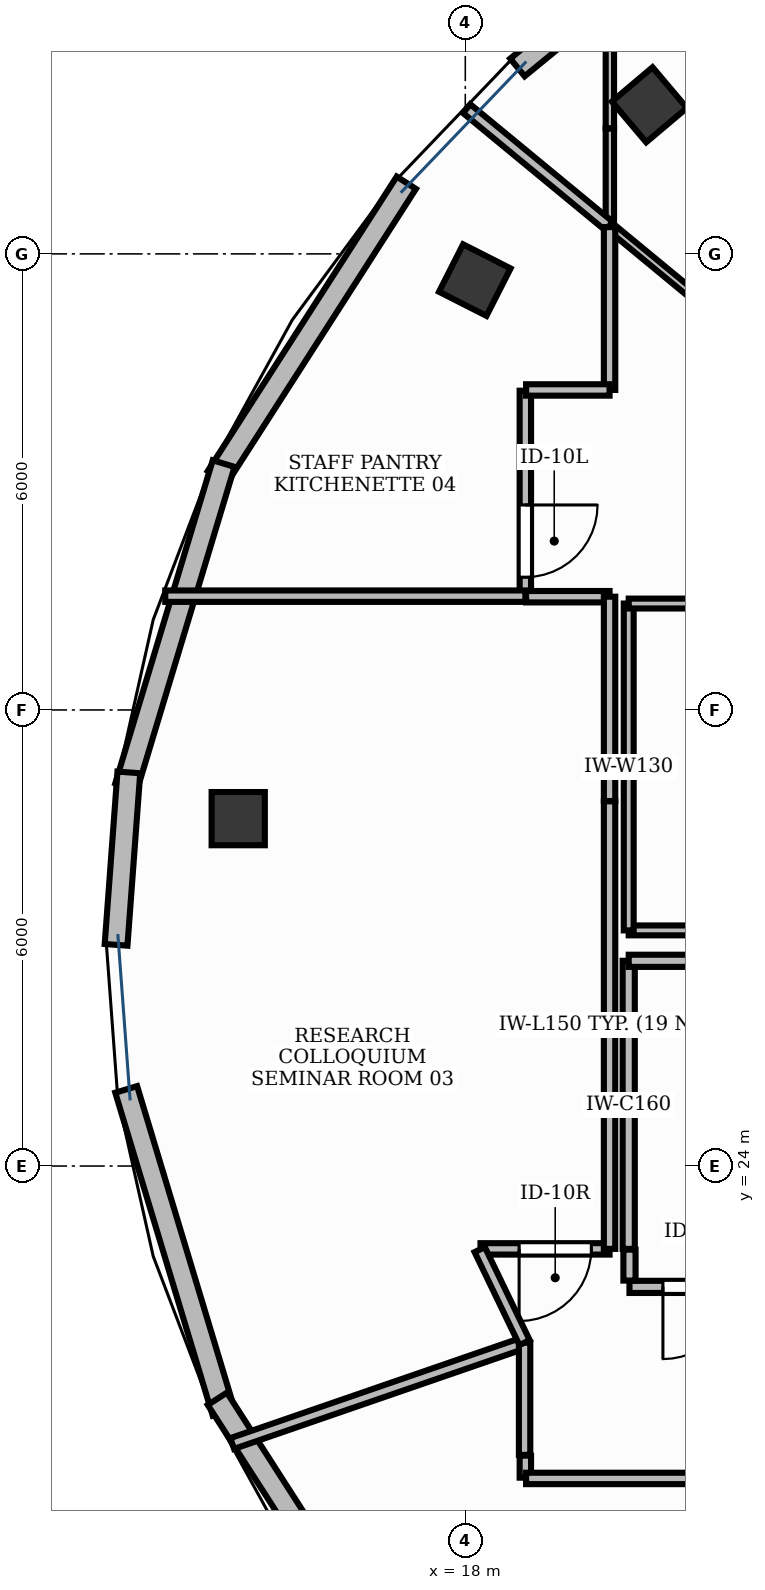
"""IFC4 building model, lengths in metres.
Left out: names, types, materials, properties, quantities, classifications, styles, units other than length and angle.
Written with IfcOpenShell. Run it as: python <this file> out.ifc"""

import sys

from ifc_helpers import new_model, si_unit, direction, frame, frame_2d, origin, origin_2d, place, context, subcontext, project, spatial, rectangle, extrude, element, fill, save


model = new_model("IFC4")
c1 = context("Model", 3, precision=1e-05, world=origin(), true_north=direction((0.0, 1.0)))
c2 = subcontext(c1, "Body", "Model", "MODEL_VIEW")
j1 = project(units=[si_unit("LENGTHUNIT", "METRE"), si_unit("PLANEANGLEUNIT", "RADIAN")], contexts=[c1])
p1 = place(None, origin())
s1 = spatial("IfcSite", under=j1, at=p1, CompositionType="ELEMENT")
p2 = place(p1, origin())
s2 = spatial("IfcBuilding", under=s1, at=p2, CompositionType="ELEMENT")
p3 = place(p2, frame((0.0, 0.0, 322.8)))
s3 = spatial("IfcBuildingStorey", under=s2, at=p3, CompositionType="ELEMENT", Elevation=322.8)
for number, where, z_axis, x_axis in (
    (1, (20.422, 37.962, -0.0), (0.0, 0.0, 1.0), (0.764, 0.645, 0.0)),
    (2, (18.125, 35.655, -0.0), (0.0, 0.0, 1.0), (0.453, 0.891, 0.0)),
    (3, (15.013, 28.57, -0.0), (0.0, 0.0, 1.0), (0.0, 1.0, 0.0)),
):
    element("IfcColumn", number, at=place(p3, frame(where, z_axis=z_axis, x_axis=x_axis)), inside=s3, PredefinedType="COLUMN", context=c2, shape_type="SweptSolid", body=[
        extrude(rectangle(XDim=0.7, YDim=0.7, at=origin_2d()), origin(), (0.0, 0.0, 1.0), 3.901),
    ])
p4 = place(p3, frame((20.64, 40.054, 0.0), z_axis=(0.0, 0.0, 1.0), x_axis=(-0.77351792086, -0.633774428411, 0.0)))
e4 = element("IfcWall", 4, at=p4, inside=s3, PredefinedType="STANDARD", context=c2, shape_type="SweptSolid", body=[
    extrude(rectangle(XDim=2.526, YDim=0.3, at=frame_2d((1.263, 0.0))), origin(), (0.0, 0.0, 1.0), 3.9),
])
p5 = place(p3, frame((17.224, 36.936, 0.0), z_axis=(0.0, 0.0, 1.0), x_axis=(-0.540087262842, -0.841609023547, 0.0)))
e5 = element("IfcWall", 5, at=p5, inside=s3, PredefinedType="STANDARD", context=c2, shape_type="SweptSolid", body=[
    extrude(rectangle(XDim=4.603, YDim=0.3, at=frame_2d((2.302, 0.0))), origin(), (0.0, 0.0, 1.0), 3.9),
])
p6 = place(p3, frame((14.821, 33.241, 0.0), z_axis=(0.0, 0.0, 1.0), x_axis=(-0.288720187326, -0.95741352269, 0.0)))
e6 = element("IfcWall", 6, at=p6, inside=s3, PredefinedType="STANDARD", context=c2, shape_type="SweptSolid", body=[
    extrude(rectangle(XDim=4.438, YDim=0.3, at=frame_2d((2.219, 0.0))), origin(), (0.0, 0.0, 1.0), 3.9),
])
p7 = place(p3, frame((13.573, 29.178, 0.0), z_axis=(0.0, 0.0, 1.0), x_axis=(-0.073741209899, -0.997277410735, 0.0)))
e7 = element("IfcWall", 7, at=p7, inside=s3, PredefinedType="STANDARD", context=c2, shape_type="SweptSolid", body=[
    extrude(rectangle(XDim=2.274, YDim=0.3, at=frame_2d((1.137, 0.0))), origin(), (0.0, 0.0, 1.0), 3.9),
])
p8 = place(p3, frame((13.539, 25.008, 0.0), z_axis=(0.0, 0.0, 1.0), x_axis=(0.288720187326, -0.95741352269, 0.0)))
e8 = element("IfcWall", 8, at=p8, inside=s3, PredefinedType="STANDARD", context=c2, shape_type="SweptSolid", body=[
    extrude(rectangle(XDim=4.438, YDim=0.3, at=frame_2d((2.219, 0.0))), origin(), (0.0, 0.0, 1.0), 3.9),
])
p9 = place(p3, frame((14.738, 20.938, 0.0), z_axis=(0.0, 0.0, 1.0), x_axis=(0.540087262842, -0.841609023547, 0.0)))
e9 = element("IfcWall", 9, at=p9, inside=s3, PredefinedType="STANDARD", context=c2, shape_type="SweptSolid", body=[
    extrude(rectangle(XDim=4.603, YDim=0.3, at=frame_2d((2.302, 0.0))), origin(), (0.0, 0.0, 1.0), 3.9),
])
p10 = place(p3, frame((21.79, 22.41, 0.0), z_axis=(0.0, 0.0, 1.0), x_axis=(-1.0, 0.0, 0.0)))
e10 = element("IfcWall", 10, at=p10, inside=s3, PredefinedType="PARTITIONING", context=c2, shape_type="SweptSolid", body=[
    extrude(rectangle(XDim=1.63, YDim=0.16, at=frame_2d((0.815, 0.0))), origin(), (0.0, 0.0, 1.0), 2.22),
])
p11 = place(p10, frame((0.24, 0.0, 0.0)))
e11 = element("IfcOpeningElement", 11, at=p11, cuts=e10, PredefinedType="OPENING", context=c2, shape_type="SweptSolid", body=[
    extrude(rectangle(XDim=0.95, YDim=2.15, at=frame_2d((0.475, 1.075))), frame((0.0, 0.095, 0.0), z_axis=(0.0, -1.0, 0.0), x_axis=(1.0, 0.0, 0.0)), (0.0, 0.0, 1.0), 0.19),
])
p12 = place(p3, frame((19.898, 22.91, 0.0), z_axis=(0.0, 0.0, 1.0), x_axis=(-1.0, 0.0, 0.0)))
e12 = element("IfcWall", 12, at=p12, inside=s3, PredefinedType="PARTITIONING", context=c2, shape_type="SweptSolid", body=[
    extrude(rectangle(XDim=1.698, YDim=0.15, at=frame_2d((0.849, 0.0))), origin(), (0.0, 0.0, 1.0), 2.22),
])
p13 = place(p12, frame((0.24, 0.0, 0.0)))
e13 = element("IfcOpeningElement", 13, at=p13, cuts=e12, PredefinedType="OPENING", context=c2, shape_type="SweptSolid", body=[
    extrude(rectangle(XDim=0.95, YDim=2.15, at=frame_2d((0.475, 1.075))), frame((0.0, 0.09, 0.0), z_axis=(0.0, -1.0, 0.0), x_axis=(1.0, 0.0, 0.0)), (0.0, 0.0, 1.0), 0.18),
])
p14 = place(p3, frame((18.79, 34.2, 0.0), z_axis=(0.0, 0.0, 1.0), x_axis=(0.0, -1.0, 0.0)))
e14 = element("IfcWall", 14, at=p14, inside=s3, PredefinedType="PARTITIONING", context=c2, shape_type="SweptSolid", body=[
    extrude(rectangle(XDim=2.693, YDim=0.15, at=frame_2d((1.346, 0.0))), origin(), (0.0, 0.0, 1.0), 2.22),
])
p15 = place(p14, frame((1.503, 0.0, 0.0)))
e15 = element("IfcOpeningElement", 15, at=p15, cuts=e14, PredefinedType="OPENING", context=c2, shape_type="SweptSolid", body=[
    extrude(rectangle(XDim=0.95, YDim=2.15, at=frame_2d((0.475, 1.075))), frame((0.0, 0.09, 0.0), z_axis=(0.0, -1.0, 0.0), x_axis=(1.0, 0.0, 0.0)), (0.0, 0.0, 1.0), 0.18),
])
p16 = place(p3, frame((20.16, 22.493, 0.0), z_axis=(0.0, 0.0, 1.0), x_axis=(0.0, 1.0, 0.0)))
e16 = element("IfcWall", 16, at=p16, inside=s3, PredefinedType="PARTITIONING", context=c2, shape_type="SweptSolid", body=[
    extrude(rectangle(XDim=0.407, YDim=0.16, at=frame_2d((0.204, 0.0))), origin(), (0.0, 0.0, 1.0), 2.22),
])
p17 = place(p3, frame((20.15, 22.91, 0.0), z_axis=(0.0, 0.0, 1.0), x_axis=(0.0, 1.0, 0.0)))
e17 = element("IfcWall", 17, at=p17, inside=s3, PredefinedType="PARTITIONING", context=c2, shape_type="SweptSolid", body=[
    extrude(rectangle(XDim=3.79, YDim=0.16, at=frame_2d((1.895, 0.0))), origin(), (0.0, 0.0, 1.0), 2.22),
])
p18 = place(p3, frame((20.15, 26.7, 0.0), z_axis=(0.0, 0.0, 1.0), x_axis=(1.0, 0.0, 0.0)))
e18 = element("IfcWall", 18, at=p18, inside=s3, PredefinedType="PARTITIONING", context=c2, shape_type="SweptSolid", body=[
    extrude(rectangle(XDim=1.64, YDim=0.16, at=frame_2d((0.82, 0.0))), origin(), (0.0, 0.0, 1.0), 2.22),
])
p19 = place(p3, frame((21.79, 27.1, 0.0), z_axis=(0.0, 0.0, 1.0), x_axis=(-1.0, 0.0, 0.0)))
e19 = element("IfcWall", 19, at=p19, inside=s3, PredefinedType="PARTITIONING", context=c2, shape_type="SweptSolid", body=[
    extrude(rectangle(XDim=1.64, YDim=0.13, at=frame_2d((0.82, 0.0))), origin(), (0.0, 0.0, 1.0), 2.22),
])
p20 = place(p3, frame((20.15, 27.1, 0.0), z_axis=(0.0, 0.0, 1.0), x_axis=(0.0, 1.0, 0.0)))
e20 = element("IfcWall", 20, at=p20, inside=s3, PredefinedType="PARTITIONING", context=c2, shape_type="SweptSolid", body=[
    extrude(rectangle(XDim=4.3, YDim=0.13, at=frame_2d((2.15, 0.0))), origin(), (0.0, 0.0, 1.0), 2.22),
])
p21 = place(p3, frame((20.15, 31.4, 0.0), z_axis=(0.0, 0.0, 1.0), x_axis=(1.0, 0.0, 0.0)))
e21 = element("IfcWall", 21, at=p21, inside=s3, PredefinedType="PARTITIONING", context=c2, shape_type="SweptSolid", body=[
    extrude(rectangle(XDim=1.64, YDim=0.13, at=frame_2d((0.82, 0.0))), origin(), (0.0, 0.0, 1.0), 2.22),
])
p22 = place(p3, frame((14.934, 20.35, 0.0), z_axis=(0.0, 0.0, 1.0), x_axis=(0.945331527332, 0.326110875979, 0.0)))
e22 = element("IfcWall", 22, at=p22, inside=s3, PredefinedType="PARTITIONING", context=c2, shape_type="SweptSolid", body=[
    extrude(rectangle(XDim=4.069, YDim=0.15, at=frame_2d((2.034, 0.0))), origin(), (0.0, 0.0, 1.0), 2.22),
])
p23 = place(p3, frame((18.78, 21.677, 0.0), z_axis=(0.0, 0.0, 1.0), x_axis=(0.0, -1.0, 0.0)))
e23 = element("IfcWall", 23, at=p23, inside=s3, PredefinedType="PARTITIONING", context=c2, shape_type="SweptSolid", body=[
    extrude(rectangle(XDim=1.477, YDim=0.15, at=frame_2d((0.738, 0.0))), origin(), (0.0, 0.0, 1.0), 2.22),
])
p24 = place(p3, frame((18.79, 20.19, 0.0), z_axis=(0.0, 0.0, 1.0), x_axis=(0.0, -1.0, 0.0)))
e24 = element("IfcWall", 24, at=p24, inside=s3, PredefinedType="PARTITIONING", context=c2, shape_type="SweptSolid", body=[
    extrude(rectangle(XDim=0.29, YDim=0.15, at=frame_2d((0.145, 0.0))), origin(), (0.0, 0.0, 1.0), 2.22),
])
p25 = place(p3, frame((18.8, 19.89, 0.0), z_axis=(0.0, 0.0, 1.0), x_axis=(1.0, 0.0, 0.0)))
e25 = element("IfcWall", 25, at=p25, inside=s3, PredefinedType="PARTITIONING", context=c2, shape_type="SweptSolid", body=[
    extrude(rectangle(XDim=2.99, YDim=0.15, at=frame_2d((1.495, 0.0))), origin(), (0.0, 0.0, 1.0), 2.22),
])
p26 = place(p3, frame((19.902, 37.652, 0.0), z_axis=(0.0, 0.0, 1.0), x_axis=(0.0, 1.0, 0.0)))
e26 = element("IfcWall", 26, at=p26, inside=s3, PredefinedType="MOVABLE", context=c2, shape_type="SweptSolid", body=[
    extrude(rectangle(XDim=1.873, YDim=0.11, at=frame_2d((0.937, 0.0))), origin(), (0.0, 0.0, 1.0), 2.22),
])
p27 = place(p3, frame((21.79, 34.805, 0.0), z_axis=(0.0, 0.0, 1.0), x_axis=(-0.771457748332, 0.636280553325, 0.0)))
e27 = element("IfcWall", 27, at=p27, inside=s3, PredefinedType="MOVABLE", context=c2, shape_type="SweptSolid", body=[
    extrude(rectangle(XDim=2.447, YDim=0.11, at=frame_2d((1.224, 0.0))), origin(), (0.0, 0.0, 1.0), 2.22),
])
p28 = place(p3, frame((19.902, 36.362, 0.0), z_axis=(0.0, 0.0, 1.0), x_axis=(0.0, 1.0, 0.0)))
e28 = element("IfcWall", 28, at=p28, inside=s3, PredefinedType="MOVABLE", context=c2, shape_type="SweptSolid", body=[
    extrude(rectangle(XDim=1.285, YDim=0.11, at=frame_2d((0.643, 0.0))), origin(), (0.0, 0.0, 1.0), 2.22),
])
p29 = place(p3, frame((14.052, 31.497, 0.0), z_axis=(0.0, 0.0, 1.0), x_axis=(1.0, 0.0, 0.0)))
e29 = element("IfcWall", 29, at=p29, inside=s3, PredefinedType="PARTITIONING", context=c2, shape_type="SweptSolid", body=[
    extrude(rectangle(XDim=4.738, YDim=0.15, at=frame_2d((2.369, 0.0))), origin(), (0.0, 0.0, 1.0), 2.22),
])
p30 = place(p3, frame((18.8, 31.49, 0.0), z_axis=(0.0, 0.0, 1.0), x_axis=(1.0, 0.0, 0.0)))
e30 = element("IfcWall", 30, at=p30, inside=s3, PredefinedType="PARTITIONING", context=c2, shape_type="SweptSolid", body=[
    extrude(rectangle(XDim=1.098, YDim=0.15, at=frame_2d((0.549, 0.0))), origin(), (0.0, 0.0, 1.0), 2.22),
])
p31 = place(p3, frame((19.898, 31.49, 0.0), z_axis=(0.0, 0.0, 1.0), x_axis=(0.0, -1.0, 0.0)))
e31 = element("IfcWall", 31, at=p31, inside=s3, PredefinedType="PARTITIONING", context=c2, shape_type="SweptSolid", body=[
    extrude(rectangle(XDim=2.112, YDim=0.15, at=frame_2d((1.056, 0.0))), origin(), (0.0, 0.0, 1.0), 2.22),
])
p32 = place(p3, frame((19.898, 29.374, 0.0), z_axis=(0.0, 0.0, 1.0), x_axis=(0.0, -1.0, 0.0)))
e32 = element("IfcWall", 32, at=p32, inside=s3, PredefinedType="PARTITIONING", context=c2, shape_type="SweptSolid", body=[
    extrude(rectangle(XDim=0.572, YDim=0.15, at=frame_2d((0.286, 0.0))), origin(), (0.0, 0.0, 1.0), 2.22),
])
p33 = place(p3, frame((19.898, 28.798, 0.0), z_axis=(0.0, 0.0, 1.0), x_axis=(0.0, -1.0, 0.0)))
e33 = element("IfcWall", 33, at=p33, inside=s3, PredefinedType="PARTITIONING", context=c2, shape_type="SweptSolid", body=[
    extrude(rectangle(XDim=5.888, YDim=0.15, at=frame_2d((2.944, 0.0))), origin(), (0.0, 0.0, 1.0), 2.22),
])
p34 = place(p3, frame((18.19, 22.9, 0.0), z_axis=(0.0, 0.0, 1.0), x_axis=(0.434442417688, -0.900699609034, 0.0)))
e34 = element("IfcWall", 34, at=p34, inside=s3, PredefinedType="PARTITIONING", context=c2, shape_type="SweptSolid", body=[
    extrude(rectangle(XDim=1.358, YDim=0.15, at=frame_2d((0.679, 0.0))), origin(), (0.0, 0.0, 1.0), 2.22),
])
p35 = place(p3, frame((18.018, 37.911, 0.0), z_axis=(0.0, 0.0, 1.0), x_axis=(0.771439858468, -0.636302243251, 0.0)))
e35 = element("IfcWall", 35, at=p35, inside=s3, PredefinedType="PARTITIONING", context=c2, shape_type="SweptSolid", body=[
    extrude(rectangle(XDim=2.43, YDim=0.15, at=frame_2d((1.215, 0.0))), origin(), (0.0, 0.0, 1.0), 2.22),
])
p36 = place(p3, frame((19.898, 36.352, 0.0), z_axis=(0.0, 0.0, 1.0), x_axis=(0.0, -1.0, 0.0)))
e36 = element("IfcWall", 36, at=p36, inside=s3, PredefinedType="PARTITIONING", context=c2, shape_type="SweptSolid", body=[
    extrude(rectangle(XDim=2.142, YDim=0.15, at=frame_2d((1.071, 0.0))), origin(), (0.0, 0.0, 1.0), 2.22),
])
p37 = place(p3, frame((19.898, 34.21, 0.0), z_axis=(0.0, 0.0, 1.0), x_axis=(-1.0, 0.0, 0.0)))
e37 = element("IfcWall", 37, at=p37, inside=s3, PredefinedType="PARTITIONING", context=c2, shape_type="SweptSolid", body=[
    extrude(rectangle(XDim=1.098, YDim=0.15, at=frame_2d((0.549, 0.0))), origin(), (0.0, 0.0, 1.0), 2.22),
])
p38 = place(p11, origin())
e38 = element("IfcDoor", 38, at=p38, inside=s3, OperationType="SINGLE_SWING_RIGHT", PredefinedType="DOOR", context=c2, shape_type="SweptSolid", body=[
    extrude(rectangle(XDim=0.95, YDim=2.15, at=frame_2d((0.475, 1.075))), frame((0.0, 0.025, 0.0), z_axis=(0.0, -1.0, 0.0), x_axis=(1.0, 0.0, 0.0)), (0.0, 0.0, 1.0), 0.05),
])
fill(e11, e38)
p39 = place(p13, origin())
e39 = element("IfcDoor", 39, at=p39, inside=s3, OperationType="SINGLE_SWING_RIGHT", PredefinedType="DOOR", context=c2, shape_type="SweptSolid", body=[
    extrude(rectangle(XDim=0.95, YDim=2.15, at=frame_2d((0.475, 1.075))), frame((0.0, 0.025, 0.0), z_axis=(0.0, -1.0, 0.0), x_axis=(1.0, 0.0, 0.0)), (0.0, 0.0, 1.0), 0.05),
])
fill(e13, e39)
p40 = place(p15, origin())
e40 = element("IfcDoor", 40, at=p40, inside=s3, OperationType="SINGLE_SWING_LEFT", PredefinedType="DOOR", context=c2, shape_type="SweptSolid", body=[
    extrude(rectangle(XDim=0.95, YDim=2.15, at=frame_2d((0.475, 1.075))), frame((0.0, 0.025, 0.0), z_axis=(0.0, -1.0, 0.0), x_axis=(1.0, 0.0, 0.0)), (0.0, 0.0, 1.0), 0.05),
])
fill(e15, e40)
save(model, sys.argv[1])
